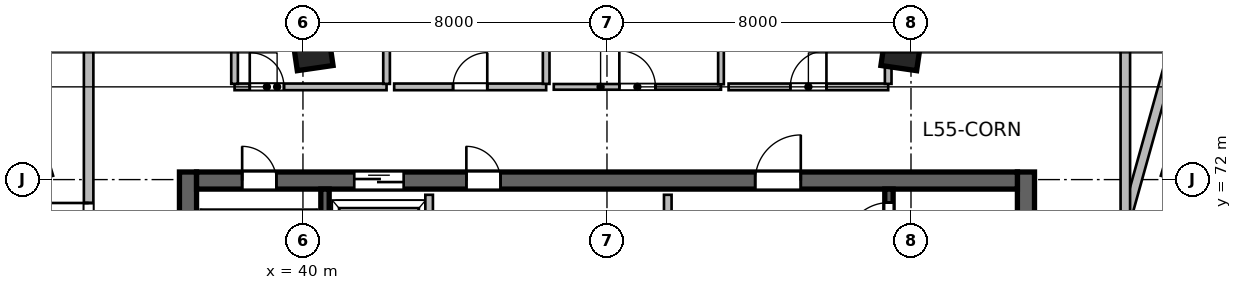
"""IFC4 building model, lengths in metres.
Left out: names, types, materials, properties, quantities, classifications, styles, units other than length and angle.
Written with IfcOpenShell. Run it as: python <this file> out.ifc"""

import sys

from ifc_helpers import new_model, si_unit, direction, frame, frame_2d, origin, origin_2d, place, context, subcontext, project, spatial, rectangle, extrude, source, transform, mapped, element, fill, save


model = new_model("IFC4")
c1 = context("Model", 3, precision=1e-05, world=origin(), true_north=direction((0.0, 1.0)))
c2 = subcontext(c1, "Body", "Model", "MODEL_VIEW")
j1 = project(units=[si_unit("LENGTHUNIT", "METRE"), si_unit("PLANEANGLEUNIT", "RADIAN")], contexts=[c1])
p1 = place(None, origin())
s1 = spatial("IfcSite", under=j1, at=p1, CompositionType="ELEMENT")
p2 = place(p1, origin())
s2 = spatial("IfcBuilding", under=s1, at=p2, CompositionType="ELEMENT")
p3 = place(p2, frame((0.0, 0.0, 227.4)))
s3 = spatial("IfcBuildingStorey", under=s2, at=p3, CompositionType="ELEMENT", Elevation=227.4)
m1 = source(origin(), c2, "Body", "SweptSolid", [
    extrude(rectangle(XDim=12.0, YDim=0.45, at=frame_2d((6.0, 0.0))), origin(), (0.0, 0.0, 1.0), 3.9),
])
for number, where, z_axis, x_axis in (
    (1, (36.975, 60.2, 0.0), (0.0, 0.0, 1.0), (0.0, 1.0, 0.0)),
    (2, (59.025, 60.2, 0.0), (0.0, 0.0, 1.0), (0.0, 1.0, 0.0)),
):
    element("IfcWall", number, at=place(p3, frame(where, z_axis=z_axis, x_axis=x_axis)), inside=s3, PredefinedType="SHEAR", context=c2, shape_type="MappedRepresentation", body=[
        mapped(m1, transform((0.0, 0.0, 0.0), scale=1.0)),
    ])
m2 = source(origin(), c2, "Body", "SweptSolid", [
    extrude(rectangle(XDim=21.6, YDim=0.45, at=frame_2d((10.8, 0.0))), origin(), (0.0, 0.0, 1.0), 3.9),
])
p4 = place(p3, frame((37.2, 71.975, 0.0), z_axis=(0.0, 0.0, 1.0), x_axis=(1.0, 0.0, 0.0)))
e3 = element("IfcWall", 3, at=p4, inside=s3, PredefinedType="SHEAR", context=c2, shape_type="MappedRepresentation", body=[
    mapped(m2, transform((0.0, 0.0, 0.0), scale=1.0)),
])
p5 = place(p4, frame((1.2, 0.0, 0.0)))
e4 = element("IfcOpeningElement", 4, at=p5, cuts=e3, PredefinedType="OPENING", context=c2, shape_type="SweptSolid", body=[
    extrude(rectangle(XDim=0.9, YDim=2.1, at=frame_2d((0.45, 1.05))), frame((0.0, 0.235, 0.0), z_axis=(0.0, -1.0, 0.0), x_axis=(1.0, 0.0, 0.0)), (0.0, 0.0, 1.0), 0.47),
])
p6 = place(p4, frame((14.7, 0.0, 0.0)))
e5 = element("IfcOpeningElement", 5, at=p6, cuts=e3, PredefinedType="OPENING", context=c2, shape_type="SweptSolid", body=[
    extrude(rectangle(XDim=1.2, YDim=2.15, at=frame_2d((0.6, 1.075))), frame((0.0, 0.235, 0.0), z_axis=(0.0, -1.0, 0.0), x_axis=(1.0, 0.0, 0.0)), (0.0, 0.0, 1.0), 0.47),
])
p7 = place(p4, frame((4.15, 0.0, 0.0)))
e6 = element("IfcOpeningElement", 6, at=p7, cuts=e3, PredefinedType="OPENING", context=c2, shape_type="SweptSolid", body=[
    extrude(rectangle(XDim=1.3, YDim=2.15, at=frame_2d((0.65, 1.075))), frame((0.0, 0.235, 0.0), z_axis=(0.0, -1.0, 0.0), x_axis=(1.0, 0.0, 0.0)), (0.0, 0.0, 1.0), 0.47),
])
p8 = place(p4, frame((7.1, 0.0, 0.0)))
e7 = element("IfcOpeningElement", 7, at=p8, cuts=e3, PredefinedType="OPENING", context=c2, shape_type="SweptSolid", body=[
    extrude(rectangle(XDim=0.9, YDim=2.1, at=frame_2d((0.45, 1.05))), frame((0.0, 0.235, 0.0), z_axis=(0.0, -1.0, 0.0), x_axis=(1.0, 0.0, 0.0)), (0.0, 0.0, 1.0), 0.47),
])
m3 = source(origin(), c2, "Body", "SweptSolid", [
    extrude(rectangle(XDim=11.1, YDim=0.22, at=frame_2d((5.55, 0.0))), origin(), (0.0, 0.0, 1.0), 3.9),
])
p9 = place(p3, frame((40.58, 60.65, 0.0), z_axis=(0.0, 0.0, 1.0), x_axis=(0.0, 1.0, 0.0)))
e8 = element("IfcWall", 8, at=p9, inside=s3, PredefinedType="SHEAR", context=c2, shape_type="MappedRepresentation", body=[
    mapped(m3, transform((0.0, 0.0, 0.0), scale=1.0)),
])
p10 = place(p3, frame((55.42, 60.65, 0.0), z_axis=(0.0, 0.0, 1.0), x_axis=(0.0, 1.0, 0.0)))
e9 = element("IfcWall", 9, at=p10, inside=s3, PredefinedType="SHEAR", context=c2, shape_type="MappedRepresentation", body=[
    mapped(m3, transform((0.0, 0.0, 0.0), scale=1.0)),
])
p11 = place(p10, frame((9.595, 0.0, 0.0)))
e10 = element("IfcOpeningElement", 10, at=p11, cuts=e9, PredefinedType="OPENING", context=c2, shape_type="SweptSolid", body=[
    extrude(rectangle(XDim=1.15, YDim=2.15, at=frame_2d((0.575, 1.075))), frame((0.0, 0.12, 0.0), z_axis=(0.0, -1.0, 0.0), x_axis=(1.0, 0.0, 0.0)), (0.0, 0.0, 1.0), 0.24),
])
m4 = source(origin(), c2, "Body", "SweptSolid", [
    extrude(rectangle(XDim=0.95, YDim=0.95, at=origin_2d()), origin(), (0.0, 0.0, 1.0), 3.9),
])
for number, where, z_axis, x_axis in (
    (11, (40.253, 75.404, 0.0), (0.0, 0.0, 1.0), (-0.143, 0.99, 0.0)),
    (12, (55.747, 75.404, 0.0), (0.0, 0.0, 1.0), (0.143, 0.99, 0.0)),
):
    element("IfcColumn", number, at=place(p3, frame(where, z_axis=z_axis, x_axis=x_axis)), inside=s3, PredefinedType="COLUMN", context=c2, shape_type="MappedRepresentation", body=[
        mapped(m4, transform((0.0, 0.0, 0.0), scale=1.0)),
    ])
m5 = source(origin(), c2, "Body", "SweptSolid", [
    extrude(rectangle(XDim=5.8, YDim=0.2, at=frame_2d((2.9, 0.0))), origin(), (0.0, 0.0, 1.0), 3.65),
])
p12 = place(p3, frame((49.6, 65.8, 0.0), z_axis=(0.0, 0.0, 1.0), x_axis=(0.0, 1.0, 0.0)))
e13 = element("IfcWall", 13, at=p12, inside=s3, PredefinedType="SOLIDWALL", context=c2, shape_type="MappedRepresentation", body=[
    mapped(m5, transform((0.0, 0.0, 0.0), scale=1.0)),
])
m6 = source(origin(), c2, "Body", "SweptSolid", [
    extrude(rectangle(XDim=3.2, YDim=0.2, at=frame_2d((1.6, 0.0))), origin(), (0.0, 0.0, 1.0), 3.65),
])
p13 = place(p3, frame((43.32, 68.4, 0.0), z_axis=(0.0, 0.0, 1.0), x_axis=(0.0, 1.0, 0.0)))
e14 = element("IfcWall", 14, at=p13, inside=s3, PredefinedType="SOLIDWALL", context=c2, shape_type="MappedRepresentation", body=[
    mapped(m6, transform((0.0, 0.0, 0.0), scale=1.0)),
])
m7 = source(origin(), c2, "Body", "SweptSolid", [
    extrude(rectangle(XDim=4.0, YDim=0.175, at=frame_2d((2.0, 0.0))), origin(), (0.0, 0.0, 1.0), 3.65),
])
p14 = place(p3, frame((38.2, 74.44, 0.0), z_axis=(0.0, 0.0, 1.0), x_axis=(1.0, 0.0, 0.0)))
e15 = element("IfcWall", 15, at=p14, inside=s3, PredefinedType="PARTITIONING", context=c2, shape_type="MappedRepresentation", body=[
    mapped(m7, transform((0.0, 0.0, 0.0), scale=1.0)),
])
p15 = place(p14, frame((0.4, 0.0, 0.0)))
e16 = element("IfcOpeningElement", 16, at=p15, cuts=e15, PredefinedType="OPENING", context=c2, shape_type="SweptSolid", body=[
    extrude(rectangle(XDim=0.9, YDim=2.08, at=frame_2d((0.45, 1.04))), frame((0.0, 0.098, 0.0), z_axis=(0.0, -1.0, 0.0), x_axis=(1.0, 0.0, 0.0)), (0.0, 0.0, 1.0), 0.195),
])
m8 = source(origin(), c2, "Body", "SweptSolid", [
    extrude(rectangle(XDim=2.403, YDim=0.175, at=frame_2d((1.201, 0.0))), origin(), (0.0, 0.0, 1.0), 3.65),
])
for number, where, z_axis, x_axis in (
    (17, (38.2, 74.519, 0.0), (0.0, 0.0, 1.0), (0.0, 1.0, 0.0)),
    (18, (42.2, 74.519, 0.0), (0.0, 0.0, 1.0), (0.0, 1.0, 0.0)),
):
    element("IfcWall", number, at=place(p3, frame(where, z_axis=z_axis, x_axis=x_axis)), inside=s3, PredefinedType="PARTITIONING", context=c2, shape_type="MappedRepresentation", body=[
        mapped(m8, transform((0.0, 0.0, 0.0), scale=1.0)),
    ])
p16 = place(p3, frame((42.4, 74.44, 0.0), z_axis=(0.0, 0.0, 1.0), x_axis=(1.0, 0.0, 0.0)))
e19 = element("IfcWall", 19, at=p16, inside=s3, PredefinedType="PARTITIONING", context=c2, shape_type="MappedRepresentation", body=[
    mapped(m7, transform((0.0, 0.0, 0.0), scale=1.0)),
])
p17 = place(p16, frame((1.55, 0.0, 0.0)))
e20 = element("IfcOpeningElement", 20, at=p17, cuts=e19, PredefinedType="OPENING", context=c2, shape_type="SweptSolid", body=[
    extrude(rectangle(XDim=0.9, YDim=2.08, at=frame_2d((0.45, 1.04))), frame((0.0, 0.098, 0.0), z_axis=(0.0, -1.0, 0.0), x_axis=(1.0, 0.0, 0.0)), (0.0, 0.0, 1.0), 0.195),
])
p18 = place(p3, frame((46.4, 74.519, 0.0), z_axis=(0.0, 0.0, 1.0), x_axis=(0.0, 1.0, 0.0)))
e21 = element("IfcWall", 21, at=p18, inside=s3, PredefinedType="PARTITIONING", context=c2, shape_type="MappedRepresentation", body=[
    mapped(m8, transform((0.0, 0.0, 0.0), scale=1.0)),
])
m9 = source(origin(), c2, "Body", "SweptSolid", [
    extrude(rectangle(XDim=4.4, YDim=0.15, at=frame_2d((2.2, 0.0))), origin(), (0.0, 0.0, 1.0), 3.65),
])
p19 = place(p3, frame((46.6, 74.44, 0.0), z_axis=(0.0, 0.0, 1.0), x_axis=(1.0, 0.0, 0.0)))
e22 = element("IfcWall", 22, at=p19, inside=s3, PredefinedType="PARTITIONING", context=c2, shape_type="MappedRepresentation", body=[
    mapped(m9, transform((0.0, 0.0, 0.0), scale=1.0)),
])
p20 = place(p19, frame((1.725, 0.0, 0.0)))
e23 = element("IfcOpeningElement", 23, at=p20, cuts=e22, PredefinedType="OPENING", context=c2, shape_type="SweptSolid", body=[
    extrude(rectangle(XDim=0.95, YDim=2.1, at=frame_2d((0.475, 1.05))), frame((0.0, 0.085, 0.0), z_axis=(0.0, -1.0, 0.0), x_axis=(1.0, 0.0, 0.0)), (0.0, 0.0, 1.0), 0.17),
])
m10 = source(origin(), c2, "Body", "SweptSolid", [
    extrude(rectangle(XDim=2.425, YDim=0.15, at=frame_2d((1.212, 0.0))), origin(), (0.0, 0.0, 1.0), 3.65),
])
p21 = place(p3, frame((51.0, 74.508, 0.0), z_axis=(0.0, 0.0, 1.0), x_axis=(0.0, 1.0, 0.0)))
e24 = element("IfcWall", 24, at=p21, inside=s3, PredefinedType="PARTITIONING", context=c2, shape_type="MappedRepresentation", body=[
    mapped(m10, transform((0.0, 0.0, 0.0), scale=1.0)),
])
m11 = source(origin(), c2, "Body", "SweptSolid", [
    extrude(rectangle(XDim=4.2, YDim=0.175, at=frame_2d((2.1, 0.0))), origin(), (0.0, 0.0, 1.0), 3.65),
])
p22 = place(p3, frame((51.2, 74.44, 0.0), z_axis=(0.0, 0.0, 1.0), x_axis=(1.0, 0.0, 0.0)))
e25 = element("IfcWall", 25, at=p22, inside=s3, PredefinedType="PARTITIONING", context=c2, shape_type="MappedRepresentation", body=[
    mapped(m11, transform((0.0, 0.0, 0.0), scale=1.0)),
])
p23 = place(p22, frame((1.625, 0.0, 0.0)))
e26 = element("IfcOpeningElement", 26, at=p23, cuts=e25, PredefinedType="OPENING", context=c2, shape_type="SweptSolid", body=[
    extrude(rectangle(XDim=0.95, YDim=2.12, at=frame_2d((0.475, 1.06))), frame((0.0, 0.098, 0.0), z_axis=(0.0, -1.0, 0.0), x_axis=(1.0, 0.0, 0.0)), (0.0, 0.0, 1.0), 0.195),
])
p24 = place(p3, frame((55.4, 74.519, 0.0), z_axis=(0.0, 0.0, 1.0), x_axis=(0.0, 1.0, 0.0)))
e27 = element("IfcWall", 27, at=p24, inside=s3, PredefinedType="PARTITIONING", context=c2, shape_type="MappedRepresentation", body=[
    mapped(m8, transform((0.0, 0.0, 0.0), scale=1.0)),
])
m12 = source(origin(), c2, "Body", "SweptSolid", [
    extrude(rectangle(XDim=13.694, YDim=0.25, at=frame_2d((6.847, 0.0))), origin(), (0.0, 0.0, 1.0), 3.65),
])
p25 = place(p3, frame((59.5, 63.216, 0.0), z_axis=(0.0, 0.0, 1.0), x_axis=(0.268753576604, 0.963208967495, 0.0)))
e28 = element("IfcWall", 28, at=p25, inside=s3, PredefinedType="PARTITIONING", context=c2, shape_type="MappedRepresentation", body=[
    mapped(m12, transform((0.0, 0.0, 0.0), scale=1.0)),
])
m13 = source(origin(), c2, "Body", "SweptSolid", [
    extrude(rectangle(XDim=19.209, YDim=0.25, at=frame_2d((9.604, 0.0))), origin(), (0.0, 0.0, 1.0), 3.65),
])
p26 = place(p3, frame((61.64, 57.96, 0.0), z_axis=(0.0, 0.0, 1.0), x_axis=(0.0, 1.0, 0.0)))
e29 = element("IfcWall", 29, at=p26, inside=s3, PredefinedType="PARTITIONING", context=c2, shape_type="MappedRepresentation", body=[
    mapped(m13, transform((0.0, 0.0, 0.0), scale=1.0)),
])
m14 = source(origin(), c2, "Body", "SweptSolid", [
    extrude(rectangle(XDim=12.669, YDim=0.25, at=frame_2d((6.334, 0.0))), origin(), (0.0, 0.0, 1.0), 3.65),
])
p27 = place(p3, frame((34.36, 64.5, 0.0), z_axis=(0.0, 0.0, 1.0), x_axis=(0.0, 1.0, 0.0)))
e30 = element("IfcWall", 30, at=p27, inside=s3, PredefinedType="PARTITIONING", context=c2, shape_type="MappedRepresentation", body=[
    mapped(m14, transform((0.0, 0.0, 0.0), scale=1.0)),
])
p28 = place(p27, frame((5.784, 0.0, 0.0)))
e31 = element("IfcOpeningElement", 31, at=p28, cuts=e30, PredefinedType="OPENING", context=c2, shape_type="SweptSolid", body=[
    extrude(rectangle(XDim=1.1, YDim=2.15, at=frame_2d((0.55, 1.075))), frame((0.0, 0.135, 0.0), z_axis=(0.0, -1.0, 0.0), x_axis=(1.0, 0.0, 0.0)), (0.0, 0.0, 1.0), 0.27),
])
m15 = source(origin(), c2, "Body", "SweptSolid", [
    extrude(rectangle(XDim=0.9, YDim=2.1, at=frame_2d((0.45, 1.05))), frame((0.0, 0.025, 0.0), z_axis=(0.0, -1.0, 0.0), x_axis=(1.0, 0.0, 0.0)), (0.0, 0.0, 1.0), 0.05),
])
p29 = place(p5, origin())
e32 = element("IfcDoor", 32, at=p29, inside=s3, OperationType="SINGLE_SWING_LEFT", PredefinedType="DOOR", context=c2, shape_type="MappedRepresentation", body=[
    mapped(m15, transform((0.0, 0.0, 0.0), scale=1.0)),
])
fill(e4, e32)
m16 = source(origin(), c2, "Body", "SweptSolid", [
    extrude(rectangle(XDim=1.15, YDim=2.15, at=frame_2d((0.575, 1.075))), frame((0.0, 0.025, 0.0), z_axis=(0.0, -1.0, 0.0), x_axis=(1.0, 0.0, 0.0)), (0.0, 0.0, 1.0), 0.05),
])
p30 = place(p11, origin())
e33 = element("IfcDoor", 33, at=p30, inside=s3, OperationType="SINGLE_SWING_LEFT", PredefinedType="DOOR", context=c2, shape_type="MappedRepresentation", body=[
    mapped(m16, transform((0.0, 0.0, 0.0), scale=1.0)),
])
fill(e10, e33)
m17 = source(origin(), c2, "Body", "SweptSolid", [
    extrude(rectangle(XDim=1.2, YDim=2.15, at=frame_2d((0.6, 1.075))), frame((0.0, 0.025, 0.0), z_axis=(0.0, -1.0, 0.0), x_axis=(1.0, 0.0, 0.0)), (0.0, 0.0, 1.0), 0.05),
])
p31 = place(p6, origin())
e34 = element("IfcDoor", 34, at=p31, inside=s3, OperationType="SINGLE_SWING_RIGHT", PredefinedType="DOOR", context=c2, shape_type="MappedRepresentation", body=[
    mapped(m17, transform((0.0, 0.0, 0.0), scale=1.0)),
])
fill(e5, e34)
m18 = source(origin(), c2, "Body", "SweptSolid", [
    extrude(rectangle(XDim=1.3, YDim=2.15, at=frame_2d((0.65, 1.075))), frame((0.0, 0.025, 0.0), z_axis=(0.0, -1.0, 0.0), x_axis=(1.0, 0.0, 0.0)), (0.0, 0.0, 1.0), 0.05),
])
p32 = place(p7, origin())
e35 = element("IfcDoor", 35, at=p32, inside=s3, OperationType="DOUBLE_DOOR_SLIDING", PredefinedType="DOOR", context=c2, shape_type="MappedRepresentation", body=[
    mapped(m18, transform((0.0, 0.0, 0.0), scale=1.0)),
])
fill(e6, e35)
p33 = place(p8, origin())
e36 = element("IfcDoor", 36, at=p33, inside=s3, OperationType="SINGLE_SWING_LEFT", PredefinedType="DOOR", context=c2, shape_type="MappedRepresentation", body=[
    mapped(m15, transform((0.0, 0.0, 0.0), scale=1.0)),
])
fill(e7, e36)
m19 = source(origin(), c2, "Body", "SweptSolid", [
    extrude(rectangle(XDim=0.9, YDim=2.08, at=frame_2d((0.45, 1.04))), frame((0.0, 0.025, 0.0), z_axis=(0.0, -1.0, 0.0), x_axis=(1.0, 0.0, 0.0)), (0.0, 0.0, 1.0), 0.05),
])
p34 = place(p15, origin())
e37 = element("IfcDoor", 37, at=p34, inside=s3, OperationType="SINGLE_SWING_LEFT", PredefinedType="DOOR", context=c2, shape_type="MappedRepresentation", body=[
    mapped(m19, transform((0.0, 0.0, 0.0), scale=1.0)),
])
fill(e16, e37)
p35 = place(p17, origin())
e38 = element("IfcDoor", 38, at=p35, inside=s3, OperationType="SINGLE_SWING_RIGHT", PredefinedType="DOOR", context=c2, shape_type="MappedRepresentation", body=[
    mapped(m19, transform((0.0, 0.0, 0.0), scale=1.0)),
])
fill(e20, e38)
m20 = source(origin(), c2, "Body", "SweptSolid", [
    extrude(rectangle(XDim=0.95, YDim=2.1, at=frame_2d((0.475, 1.05))), frame((0.0, 0.025, 0.0), z_axis=(0.0, -1.0, 0.0), x_axis=(1.0, 0.0, 0.0)), (0.0, 0.0, 1.0), 0.05),
])
p36 = place(p20, origin())
e39 = element("IfcDoor", 39, at=p36, inside=s3, OperationType="SINGLE_SWING_LEFT", PredefinedType="DOOR", context=c2, shape_type="MappedRepresentation", body=[
    mapped(m20, transform((0.0, 0.0, 0.0), scale=1.0)),
])
fill(e23, e39)
m21 = source(origin(), c2, "Body", "SweptSolid", [
    extrude(rectangle(XDim=0.95, YDim=2.12, at=frame_2d((0.475, 1.06))), frame((0.0, 0.025, 0.0), z_axis=(0.0, -1.0, 0.0), x_axis=(1.0, 0.0, 0.0)), (0.0, 0.0, 1.0), 0.05),
])
p37 = place(p23, origin())
e40 = element("IfcDoor", 40, at=p37, inside=s3, OperationType="SINGLE_SWING_RIGHT", PredefinedType="DOOR", context=c2, shape_type="MappedRepresentation", body=[
    mapped(m21, transform((0.0, 0.0, 0.0), scale=1.0)),
])
fill(e26, e40)
m22 = source(origin(), c2, "Body", "SweptSolid", [
    extrude(rectangle(XDim=1.1, YDim=2.15, at=frame_2d((0.55, 1.075))), frame((0.0, 0.025, 0.0), z_axis=(0.0, -1.0, 0.0), x_axis=(1.0, 0.0, 0.0)), (0.0, 0.0, 1.0), 0.05),
])
p38 = place(p28, origin())
e41 = element("IfcDoor", 41, at=p38, inside=s3, OperationType="SINGLE_SWING_RIGHT", PredefinedType="DOOR", context=c2, shape_type="MappedRepresentation", body=[
    mapped(m22, transform((0.0, 0.0, 0.0), scale=1.0)),
])
fill(e31, e41)
save(model, sys.argv[1])
